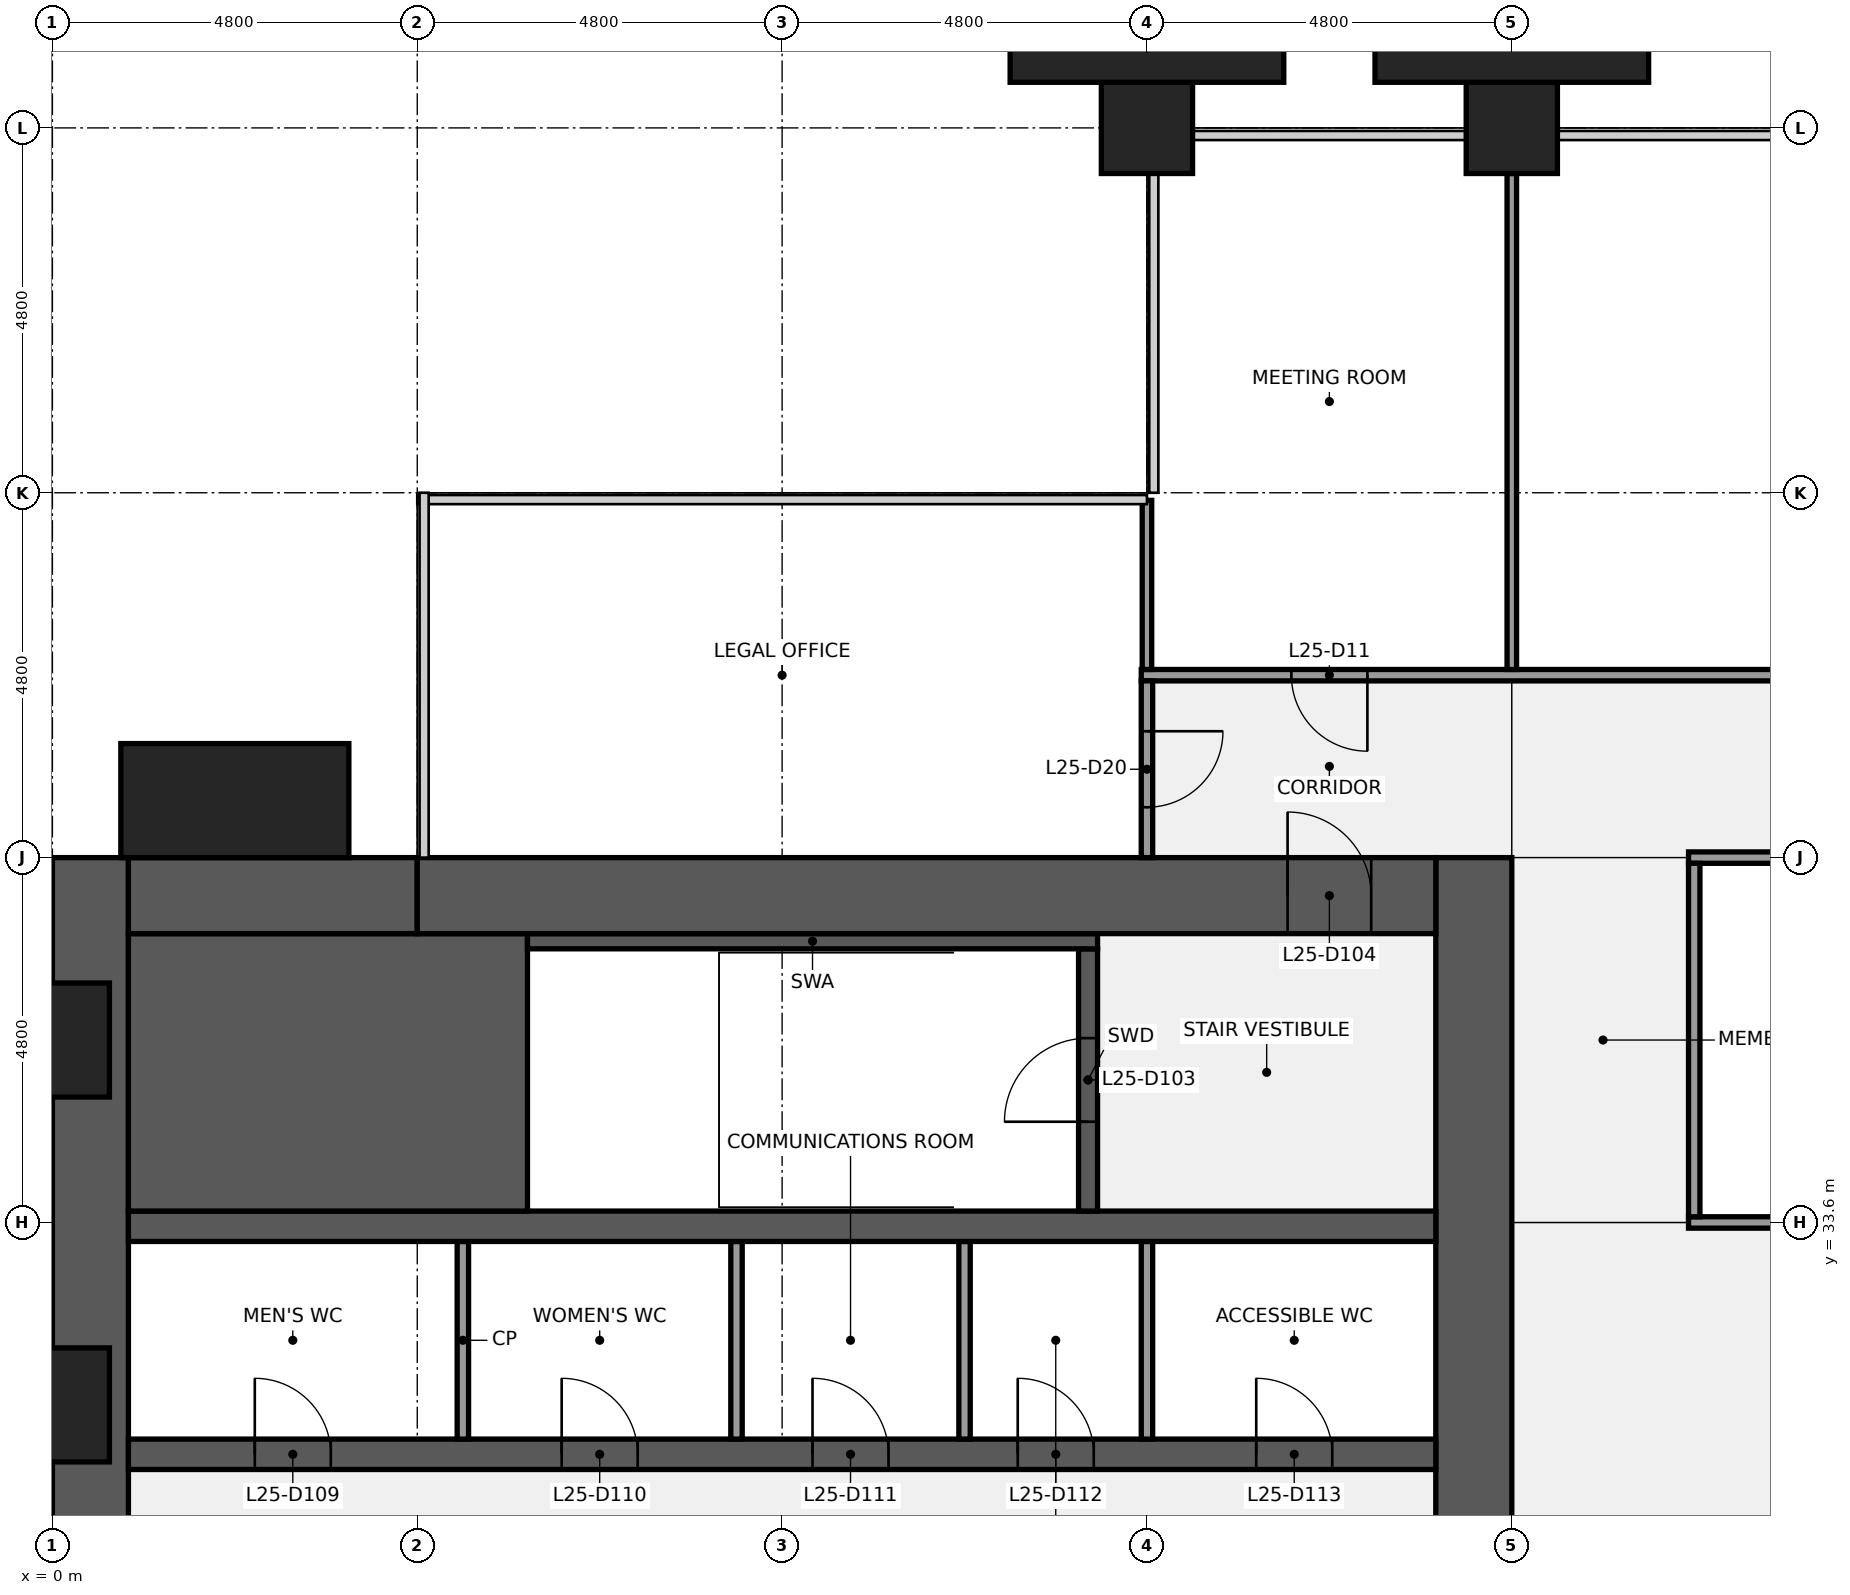
"""IFC4 building model, lengths in metres.
Left out: names, types, materials, properties, quantities, classifications, styles, units other than length and angle.
Written with IfcOpenShell. Run it as: python <this file> out.ifc"""

import sys

from ifc_helpers import new_model, si_unit, direction, frame, frame_2d, origin, origin_2d, place, context, subcontext, project, spatial, rectangle, extrude, element, fill, save


model = new_model("IFC4")
c1 = context("Model", 3, precision=1e-05, world=origin(), true_north=direction((0.0, 1.0)))
c2 = subcontext(c1, "Body", "Model", "MODEL_VIEW")
j1 = project(units=[si_unit("LENGTHUNIT", "METRE"), si_unit("PLANEANGLEUNIT", "RADIAN")], contexts=[c1])
p1 = place(None, origin())
s1 = spatial("IfcSite", under=j1, at=p1, CompositionType="ELEMENT")
p2 = place(p1, origin())
s2 = spatial("IfcBuilding", under=s1, at=p2, CompositionType="ELEMENT")
p3 = place(p2, frame((0.0, 0.0, 120.1)))
s3 = spatial("IfcBuildingStorey", under=s2, at=p3, CompositionType="ELEMENT", Elevation=120.1)
for number, where, z_axis, x_axis in (
    (1, (14.4, 48.0, 0.0), (0.0, 0.0, 1.0), (1.0, 0.0, 0.0)),
    (2, (19.2, 48.0, 0.0), (0.0, 0.0, 1.0), (1.0, 0.0, 0.0)),
):
    element("IfcColumn", number, at=place(p3, frame(where, z_axis=z_axis, x_axis=x_axis)), inside=s3, PredefinedType="COLUMN", context=c2, shape_type="SweptSolid", body=[
        extrude(rectangle(XDim=1.2, YDim=1.2, at=origin_2d()), origin(), (0.0, 0.0, 1.0), 4.0),
    ])
p4 = place(p3, frame((0.5, 9.6, 0.0), z_axis=(0.0, 0.0, 1.0), x_axis=(0.0, 1.0, 0.0)))
e3 = element("IfcWall", 3, at=p4, inside=s3, PredefinedType="SHEAR", context=c2, shape_type="SweptSolid", body=[
    extrude(rectangle(XDim=28.8, YDim=1.0, at=frame_2d((14.4, 0.0))), origin(), (0.0, 0.0, 1.0), 3.84),
])
p5 = place(p4, frame((8.85, 0.0, 0.9)))
e4 = element("IfcOpeningElement", 4, at=p5, cuts=e3, PredefinedType="OPENING", context=c2, shape_type="SweptSolid", body=[
    extrude(rectangle(XDim=1.5, YDim=1.5, at=frame_2d((0.75, 0.75))), frame((0.0, 0.51, 0.0), z_axis=(0.0, -1.0, 0.0), x_axis=(1.0, 0.0, 0.0)), (0.0, 0.0, 1.0), 1.02),
])
p6 = place(p4, frame((18.45, 0.0, 0.9)))
e5 = element("IfcOpeningElement", 5, at=p6, cuts=e3, PredefinedType="OPENING", context=c2, shape_type="SweptSolid", body=[
    extrude(rectangle(XDim=1.5, YDim=1.5, at=frame_2d((0.75, 0.75))), frame((0.0, 0.51, 0.0), z_axis=(0.0, -1.0, 0.0), x_axis=(1.0, 0.0, 0.0)), (0.0, 0.0, 1.0), 1.02),
])
p7 = place(p3, frame((18.7, 38.4, 0.0), z_axis=(0.0, 0.0, 1.0), x_axis=(0.0, -1.0, 0.0)))
e6 = element("IfcWall", 6, at=p7, inside=s3, PredefinedType="SHEAR", context=c2, shape_type="SweptSolid", body=[
    extrude(rectangle(XDim=28.8, YDim=1.0, at=frame_2d((14.4, 0.0))), origin(), (0.0, 0.0, 1.0), 3.84),
])
p8 = place(p7, frame((18.3, 0.0, 0.0)))
e7 = element("IfcOpeningElement", 7, at=p8, cuts=e6, PredefinedType="OPENING", context=c2, shape_type="SweptSolid", body=[
    extrude(rectangle(XDim=1.8, YDim=2.1, at=frame_2d((0.9, 1.05))), frame((0.0, 0.51, 0.0), z_axis=(0.0, -1.0, 0.0), x_axis=(1.0, 0.0, 0.0)), (0.0, 0.0, 1.0), 1.02),
])
p9 = place(p7, frame((8.7, 0.0, 0.0)))
e8 = element("IfcOpeningElement", 8, at=p9, cuts=e6, PredefinedType="OPENING", context=c2, shape_type="SweptSolid", body=[
    extrude(rectangle(XDim=1.8, YDim=2.1, at=frame_2d((0.9, 1.05))), frame((0.0, 0.51, 0.0), z_axis=(0.0, -1.0, 0.0), x_axis=(1.0, 0.0, 0.0)), (0.0, 0.0, 1.0), 1.02),
])
p10 = place(p3, frame((1.0, 30.55, 0.0), z_axis=(0.0, 0.0, 1.0), x_axis=(1.0, 0.0, 0.0)))
e9 = element("IfcWall", 9, at=p10, inside=s3, PredefinedType="SHEAR", context=c2, shape_type="SweptSolid", body=[
    extrude(rectangle(XDim=17.2, YDim=0.4, at=frame_2d((8.6, 0.0))), origin(), (0.0, 0.0, 1.0), 3.84),
])
p11 = place(p10, frame((1.663, 0.0, 0.0)))
e10 = element("IfcOpeningElement", 10, at=p11, cuts=e9, PredefinedType="OPENING", context=c2, shape_type="SweptSolid", body=[
    extrude(rectangle(XDim=1.0, YDim=2.1, at=frame_2d((0.5, 1.05))), frame((0.0, 0.21, 0.0), z_axis=(0.0, -1.0, 0.0), x_axis=(1.0, 0.0, 0.0)), (0.0, 0.0, 1.0), 0.42),
])
p12 = place(p10, frame((5.7, 0.0, 0.0)))
e11 = element("IfcOpeningElement", 11, at=p12, cuts=e9, PredefinedType="OPENING", context=c2, shape_type="SweptSolid", body=[
    extrude(rectangle(XDim=1.0, YDim=2.1, at=frame_2d((0.5, 1.05))), frame((0.0, 0.21, 0.0), z_axis=(0.0, -1.0, 0.0), x_axis=(1.0, 0.0, 0.0)), (0.0, 0.0, 1.0), 0.42),
])
p13 = place(p10, frame((9.0, 0.0, 0.0)))
e12 = element("IfcOpeningElement", 12, at=p13, cuts=e9, PredefinedType="OPENING", context=c2, shape_type="SweptSolid", body=[
    extrude(rectangle(XDim=1.0, YDim=2.1, at=frame_2d((0.5, 1.05))), frame((0.0, 0.21, 0.0), z_axis=(0.0, -1.0, 0.0), x_axis=(1.0, 0.0, 0.0)), (0.0, 0.0, 1.0), 0.42),
])
p14 = place(p10, frame((11.7, 0.0, 0.0)))
e13 = element("IfcOpeningElement", 13, at=p14, cuts=e9, PredefinedType="OPENING", context=c2, shape_type="SweptSolid", body=[
    extrude(rectangle(XDim=1.0, YDim=2.1, at=frame_2d((0.5, 1.05))), frame((0.0, 0.21, 0.0), z_axis=(0.0, -1.0, 0.0), x_axis=(1.0, 0.0, 0.0)), (0.0, 0.0, 1.0), 0.42),
])
p15 = place(p10, frame((14.837, 0.0, 0.0)))
e14 = element("IfcOpeningElement", 14, at=p15, cuts=e9, PredefinedType="OPENING", context=c2, shape_type="SweptSolid", body=[
    extrude(rectangle(XDim=1.0, YDim=2.1, at=frame_2d((0.5, 1.05))), frame((0.0, 0.21, 0.0), z_axis=(0.0, -1.0, 0.0), x_axis=(1.0, 0.0, 0.0)), (0.0, 0.0, 1.0), 0.42),
])
for number, where, z_axis, x_axis in (
    (15, (5.4, 30.75, 0.0), (0.0, 0.0, 1.0), (0.0, 1.0, 0.0)),
    (16, (9.0, 30.75, 0.0), (0.0, 0.0, 1.0), (0.0, 1.0, 0.0)),
    (17, (12.0, 30.75, 0.0), (0.0, 0.0, 1.0), (0.0, 1.0, 0.0)),
    (18, (14.4, 30.75, 0.0), (0.0, 0.0, 1.0), (0.0, 1.0, 0.0)),
):
    element("IfcWall", number, at=place(p3, frame(where, z_axis=z_axis, x_axis=x_axis)), inside=s3, PredefinedType="PARTITIONING", context=c2, shape_type="SweptSolid", body=[
        extrude(rectangle(XDim=2.6, YDim=0.15, at=frame_2d((1.3, 0.0))), origin(), (0.0, 0.0, 1.0), 3.84),
    ])
p16 = place(p3, frame((1.0, 33.55, 0.0), z_axis=(0.0, 0.0, 1.0), x_axis=(1.0, 0.0, 0.0)))
e19 = element("IfcWall", 19, at=p16, inside=s3, PredefinedType="SHEAR", context=c2, shape_type="SweptSolid", body=[
    extrude(rectangle(XDim=17.2, YDim=0.4, at=frame_2d((8.6, 0.0))), origin(), (0.0, 0.0, 1.0), 3.84),
])
p17 = place(p3, frame((1.0, 35.575, 0.0), z_axis=(0.0, 0.0, 1.0), x_axis=(1.0, 0.0, 0.0)))
e20 = element("IfcWall", 20, at=p17, inside=s3, PredefinedType="SHEAR", context=c2, shape_type="SweptSolid", body=[
    extrude(rectangle(XDim=5.25, YDim=3.65, at=frame_2d((2.625, 0.0))), origin(), (0.0, 0.0, 1.0), 3.84),
])
p18 = place(p3, frame((13.625, 33.75, 0.0), z_axis=(0.0, 0.0, 1.0), x_axis=(0.0, 1.0, 0.0)))
e21 = element("IfcWall", 21, at=p18, inside=s3, PredefinedType="SHEAR", context=c2, shape_type="SweptSolid", body=[
    extrude(rectangle(XDim=3.45, YDim=0.25, at=frame_2d((1.725, 0.0))), origin(), (0.0, 0.0, 1.0), 3.84),
])
p19 = place(p18, frame((1.175, 0.0, 0.0)))
e22 = element("IfcOpeningElement", 22, at=p19, cuts=e21, PredefinedType="OPENING", context=c2, shape_type="SweptSolid", body=[
    extrude(rectangle(XDim=1.1, YDim=2.1, at=frame_2d((0.55, 1.05))), frame((0.0, 0.135, 0.0), z_axis=(0.0, -1.0, 0.0), x_axis=(1.0, 0.0, 0.0)), (0.0, 0.0, 1.0), 0.27),
])
p20 = place(p3, frame((6.25, 37.3, 0.0), z_axis=(0.0, 0.0, 1.0), x_axis=(1.0, 0.0, 0.0)))
e23 = element("IfcWall", 23, at=p20, inside=s3, PredefinedType="SHEAR", context=c2, shape_type="SweptSolid", body=[
    extrude(rectangle(XDim=7.5, YDim=0.2, at=frame_2d((3.75, 0.0))), origin(), (0.0, 0.0, 1.0), 3.84),
])
p21 = place(p3, frame((1.0, 37.9, 0.0), z_axis=(0.0, 0.0, 1.0), x_axis=(1.0, 0.0, 0.0)))
e24 = element("IfcWall", 24, at=p21, inside=s3, PredefinedType="SHEAR", context=c2, shape_type="SweptSolid", body=[
    extrude(rectangle(XDim=3.8, YDim=1.0, at=frame_2d((1.9, 0.0))), origin(), (0.0, 0.0, 1.0), 3.84),
])
p22 = place(p3, frame((4.8, 37.9, 0.0), z_axis=(0.0, 0.0, 1.0), x_axis=(1.0, 0.0, 0.0)))
e25 = element("IfcWall", 25, at=p22, inside=s3, PredefinedType="SHEAR", context=c2, shape_type="SweptSolid", body=[
    extrude(rectangle(XDim=13.4, YDim=1.0, at=frame_2d((6.7, 0.0))), origin(), (0.0, 0.0, 1.0), 3.84),
])
p23 = place(p22, frame((11.45, 0.0, 0.0)))
e26 = element("IfcOpeningElement", 26, at=p23, cuts=e25, PredefinedType="OPENING", context=c2, shape_type="SweptSolid", body=[
    extrude(rectangle(XDim=1.1, YDim=2.1, at=frame_2d((0.55, 1.05))), frame((0.0, 0.51, 0.0), z_axis=(0.0, -1.0, 0.0), x_axis=(1.0, 0.0, 0.0)), (0.0, 0.0, 1.0), 1.02),
])
p24 = place(p3, frame((21.525, 33.6, 0.0), z_axis=(0.0, 0.0, 1.0), x_axis=(1.0, 0.0, 0.0)))
e27 = element("IfcWall", 27, at=p24, inside=s3, PredefinedType="PARTITIONING", context=c2, shape_type="SweptSolid", body=[
    extrude(rectangle(XDim=2.55, YDim=0.15, at=frame_2d((1.275, 0.0))), origin(), (0.0, 0.0, 1.0), 2.936),
])
p25 = place(p3, frame((21.525, 38.4, 0.0), z_axis=(0.0, 0.0, 1.0), x_axis=(1.0, 0.0, 0.0)))
e28 = element("IfcWall", 28, at=p25, inside=s3, PredefinedType="PARTITIONING", context=c2, shape_type="SweptSolid", body=[
    extrude(rectangle(XDim=14.55, YDim=0.15, at=frame_2d((7.275, 0.0))), origin(), (0.0, 0.0, 1.0), 2.936),
])
p26 = place(p25, frame((3.175, 0.0, 0.0)))
e29 = element("IfcOpeningElement", 29, at=p26, cuts=e28, PredefinedType="OPENING", context=c2, shape_type="SweptSolid", body=[
    extrude(rectangle(XDim=1.0, YDim=2.1, at=frame_2d((0.5, 1.05))), frame((0.0, 0.085, 0.0), z_axis=(0.0, -1.0, 0.0), x_axis=(1.0, 0.0, 0.0)), (0.0, 0.0, 1.0), 0.17),
])
p27 = place(p25, frame((10.375, 0.0, 0.0)))
e30 = element("IfcOpeningElement", 30, at=p27, cuts=e28, PredefinedType="OPENING", context=c2, shape_type="SweptSolid", body=[
    extrude(rectangle(XDim=1.0, YDim=2.1, at=frame_2d((0.5, 1.05))), frame((0.0, 0.085, 0.0), z_axis=(0.0, -1.0, 0.0), x_axis=(1.0, 0.0, 0.0)), (0.0, 0.0, 1.0), 0.17),
])
p28 = place(p3, frame((14.325, 40.8, 0.0), z_axis=(0.0, 0.0, 1.0), x_axis=(1.0, 0.0, 0.0)))
e31 = element("IfcWall", 31, at=p28, inside=s3, PredefinedType="PARTITIONING", context=c2, shape_type="SweptSolid", body=[
    extrude(rectangle(XDim=28.95, YDim=0.15, at=frame_2d((14.475, 0.0))), origin(), (0.0, 0.0, 1.0), 2.936),
])
p29 = place(p28, frame((1.975, 0.0, 0.0)))
e32 = element("IfcOpeningElement", 32, at=p29, cuts=e31, PredefinedType="OPENING", context=c2, shape_type="SweptSolid", body=[
    extrude(rectangle(XDim=1.0, YDim=2.1, at=frame_2d((0.5, 1.05))), frame((0.0, 0.085, 0.0), z_axis=(0.0, -1.0, 0.0), x_axis=(1.0, 0.0, 0.0)), (0.0, 0.0, 1.0), 0.17),
])
p30 = place(p28, frame((9.175, 0.0, 0.0)))
e33 = element("IfcOpeningElement", 33, at=p30, cuts=e31, PredefinedType="OPENING", context=c2, shape_type="SweptSolid", body=[
    extrude(rectangle(XDim=1.0, YDim=2.1, at=frame_2d((0.5, 1.05))), frame((0.0, 0.085, 0.0), z_axis=(0.0, -1.0, 0.0), x_axis=(1.0, 0.0, 0.0)), (0.0, 0.0, 1.0), 0.17),
])
p31 = place(p28, frame((15.175, 0.0, 0.0)))
e34 = element("IfcOpeningElement", 34, at=p31, cuts=e31, PredefinedType="OPENING", context=c2, shape_type="SweptSolid", body=[
    extrude(rectangle(XDim=1.0, YDim=2.1, at=frame_2d((0.5, 1.05))), frame((0.0, 0.085, 0.0), z_axis=(0.0, -1.0, 0.0), x_axis=(1.0, 0.0, 0.0)), (0.0, 0.0, 1.0), 0.17),
])
p32 = place(p28, frame((19.975, 0.0, 0.0)))
e35 = element("IfcOpeningElement", 35, at=p32, cuts=e31, PredefinedType="OPENING", context=c2, shape_type="SweptSolid", body=[
    extrude(rectangle(XDim=1.0, YDim=2.1, at=frame_2d((0.5, 1.05))), frame((0.0, 0.085, 0.0), z_axis=(0.0, -1.0, 0.0), x_axis=(1.0, 0.0, 0.0)), (0.0, 0.0, 1.0), 0.17),
])
p33 = place(p28, frame((25.975, 0.0, 0.0)))
e36 = element("IfcOpeningElement", 36, at=p33, cuts=e31, PredefinedType="OPENING", context=c2, shape_type="SweptSolid", body=[
    extrude(rectangle(XDim=1.0, YDim=2.1, at=frame_2d((0.5, 1.05))), frame((0.0, 0.085, 0.0), z_axis=(0.0, -1.0, 0.0), x_axis=(1.0, 0.0, 0.0)), (0.0, 0.0, 1.0), 0.17),
])
p34 = place(p3, frame((14.4, 40.875, 0.0), z_axis=(0.0, 0.0, 1.0), x_axis=(0.0, 1.0, 0.0)))
e37 = element("IfcWall", 37, at=p34, inside=s3, PredefinedType="PARTITIONING", context=c2, shape_type="SweptSolid", body=[
    extrude(rectangle(XDim=2.225, YDim=0.125, at=frame_2d((1.113, 0.0))), origin(), (0.0, 0.0, 1.0), 2.936),
])
p35 = place(p3, frame((14.4, 38.4, 0.0), z_axis=(0.0, 0.0, 1.0), x_axis=(0.0, 1.0, 0.0)))
e38 = element("IfcWall", 38, at=p35, inside=s3, PredefinedType="PARTITIONING", context=c2, shape_type="SweptSolid", body=[
    extrude(rectangle(XDim=2.325, YDim=0.15, at=frame_2d((1.163, 0.0))), origin(), (0.0, 0.0, 1.0), 2.936),
])
p36 = place(p35, frame((0.663, 0.0, 0.0)))
e39 = element("IfcOpeningElement", 39, at=p36, cuts=e38, PredefinedType="OPENING", context=c2, shape_type="SweptSolid", body=[
    extrude(rectangle(XDim=1.0, YDim=2.1, at=frame_2d((0.5, 1.05))), frame((0.0, 0.085, 0.0), z_axis=(0.0, -1.0, 0.0), x_axis=(1.0, 0.0, 0.0)), (0.0, 0.0, 1.0), 0.17),
])
p37 = place(p3, frame((19.2, 40.875, 0.0), z_axis=(0.0, 0.0, 1.0), x_axis=(0.0, 1.0, 0.0)))
e40 = element("IfcWall", 40, at=p37, inside=s3, PredefinedType="PARTITIONING", context=c2, shape_type="SweptSolid", body=[
    extrude(rectangle(XDim=6.525, YDim=0.125, at=frame_2d((3.262, 0.0))), origin(), (0.0, 0.0, 1.0), 2.936),
])
p38 = place(p3, frame((21.6, 33.675, 0.0), z_axis=(0.0, 0.0, 1.0), x_axis=(0.0, 1.0, 0.0)))
e41 = element("IfcWall", 41, at=p38, inside=s3, PredefinedType="PARTITIONING", context=c2, shape_type="SweptSolid", body=[
    extrude(rectangle(XDim=4.65, YDim=0.15, at=frame_2d((2.325, 0.0))), origin(), (0.0, 0.0, 1.0), 2.936),
])
p39 = place(p3, frame((2.4, 39.15, 0.0), z_axis=(0.0, 0.0, 1.0), x_axis=(1.0, 0.0, 0.0)))
e42 = element("IfcColumn", 42, at=p39, inside=s3, PredefinedType="PILASTER", context=c2, shape_type="SweptSolid", body=[
    extrude(rectangle(XDim=3.0, YDim=1.5, at=origin_2d()), origin(), (0.0, 0.0, 1.0), 4.0),
])
for number, where, z_axis, x_axis in (
    (43, (14.4, 49.05, 0.0), (0.0, 0.0, 1.0), (1.0, 0.0, 0.0)),
    (44, (19.2, 49.05, 0.0), (0.0, 0.0, 1.0), (1.0, 0.0, 0.0)),
):
    element("IfcColumn", number, at=place(p3, frame(where, z_axis=z_axis, x_axis=x_axis)), inside=s3, PredefinedType="PILASTER", context=c2, shape_type="SweptSolid", body=[
        extrude(rectangle(XDim=3.6, YDim=0.9, at=origin_2d()), origin(), (0.0, 0.0, 1.0), 4.0),
    ])
p40 = place(p19, origin())
e45 = element("IfcDoor", 45, at=p40, inside=s3, OperationType="SINGLE_SWING_LEFT", PredefinedType="DOOR", context=c2, shape_type="SweptSolid", body=[
    extrude(rectangle(XDim=1.1, YDim=2.1, at=frame_2d((0.55, 1.05))), frame((0.0, 0.025, 0.0), z_axis=(0.0, -1.0, 0.0), x_axis=(1.0, 0.0, 0.0)), (0.0, 0.0, 1.0), 0.05),
])
fill(e22, e45)
p41 = place(p23, origin())
e46 = element("IfcDoor", 46, at=p41, inside=s3, OperationType="SINGLE_SWING_LEFT", PredefinedType="DOOR", context=c2, shape_type="SweptSolid", body=[
    extrude(rectangle(XDim=1.1, YDim=2.1, at=frame_2d((0.55, 1.05))), frame((0.0, 0.025, 0.0), z_axis=(0.0, -1.0, 0.0), x_axis=(1.0, 0.0, 0.0)), (0.0, 0.0, 1.0), 0.05),
])
fill(e26, e46)
p42 = place(p11, origin())
e47 = element("IfcDoor", 47, at=p42, inside=s3, OperationType="SINGLE_SWING_LEFT", PredefinedType="DOOR", context=c2, shape_type="SweptSolid", body=[
    extrude(rectangle(XDim=1.0, YDim=2.1, at=frame_2d((0.5, 1.05))), frame((0.0, 0.025, 0.0), z_axis=(0.0, -1.0, 0.0), x_axis=(1.0, 0.0, 0.0)), (0.0, 0.0, 1.0), 0.05),
])
fill(e10, e47)
p43 = place(p12, origin())
e48 = element("IfcDoor", 48, at=p43, inside=s3, OperationType="SINGLE_SWING_LEFT", PredefinedType="DOOR", context=c2, shape_type="SweptSolid", body=[
    extrude(rectangle(XDim=1.0, YDim=2.1, at=frame_2d((0.5, 1.05))), frame((0.0, 0.025, 0.0), z_axis=(0.0, -1.0, 0.0), x_axis=(1.0, 0.0, 0.0)), (0.0, 0.0, 1.0), 0.05),
])
fill(e11, e48)
p44 = place(p13, origin())
e49 = element("IfcDoor", 49, at=p44, inside=s3, OperationType="SINGLE_SWING_LEFT", PredefinedType="DOOR", context=c2, shape_type="SweptSolid", body=[
    extrude(rectangle(XDim=1.0, YDim=2.1, at=frame_2d((0.5, 1.05))), frame((0.0, 0.025, 0.0), z_axis=(0.0, -1.0, 0.0), x_axis=(1.0, 0.0, 0.0)), (0.0, 0.0, 1.0), 0.05),
])
fill(e12, e49)
p45 = place(p14, origin())
e50 = element("IfcDoor", 50, at=p45, inside=s3, OperationType="SINGLE_SWING_LEFT", PredefinedType="DOOR", context=c2, shape_type="SweptSolid", body=[
    extrude(rectangle(XDim=1.0, YDim=2.1, at=frame_2d((0.5, 1.05))), frame((0.0, 0.025, 0.0), z_axis=(0.0, -1.0, 0.0), x_axis=(1.0, 0.0, 0.0)), (0.0, 0.0, 1.0), 0.05),
])
fill(e13, e50)
p46 = place(p15, origin())
e51 = element("IfcDoor", 51, at=p46, inside=s3, OperationType="SINGLE_SWING_LEFT", PredefinedType="DOOR", context=c2, shape_type="SweptSolid", body=[
    extrude(rectangle(XDim=1.0, YDim=2.1, at=frame_2d((0.5, 1.05))), frame((0.0, 0.025, 0.0), z_axis=(0.0, -1.0, 0.0), x_axis=(1.0, 0.0, 0.0)), (0.0, 0.0, 1.0), 0.05),
])
fill(e14, e51)
p47 = place(p29, origin())
e52 = element("IfcDoor", 52, at=p47, inside=s3, OperationType="SINGLE_SWING_RIGHT", PredefinedType="DOOR", context=c2, shape_type="SweptSolid", body=[
    extrude(rectangle(XDim=1.0, YDim=2.1, at=frame_2d((0.5, 1.05))), frame((0.0, 0.025, 0.0), z_axis=(0.0, -1.0, 0.0), x_axis=(1.0, 0.0, 0.0)), (0.0, 0.0, 1.0), 0.05),
])
fill(e32, e52)
p48 = place(p36, origin())
e53 = element("IfcDoor", 53, at=p48, inside=s3, OperationType="SINGLE_SWING_RIGHT", PredefinedType="DOOR", context=c2, shape_type="SweptSolid", body=[
    extrude(rectangle(XDim=1.0, YDim=2.1, at=frame_2d((0.5, 1.05))), frame((0.0, 0.025, 0.0), z_axis=(0.0, -1.0, 0.0), x_axis=(1.0, 0.0, 0.0)), (0.0, 0.0, 1.0), 0.05),
])
fill(e39, e53)
save(model, sys.argv[1])
